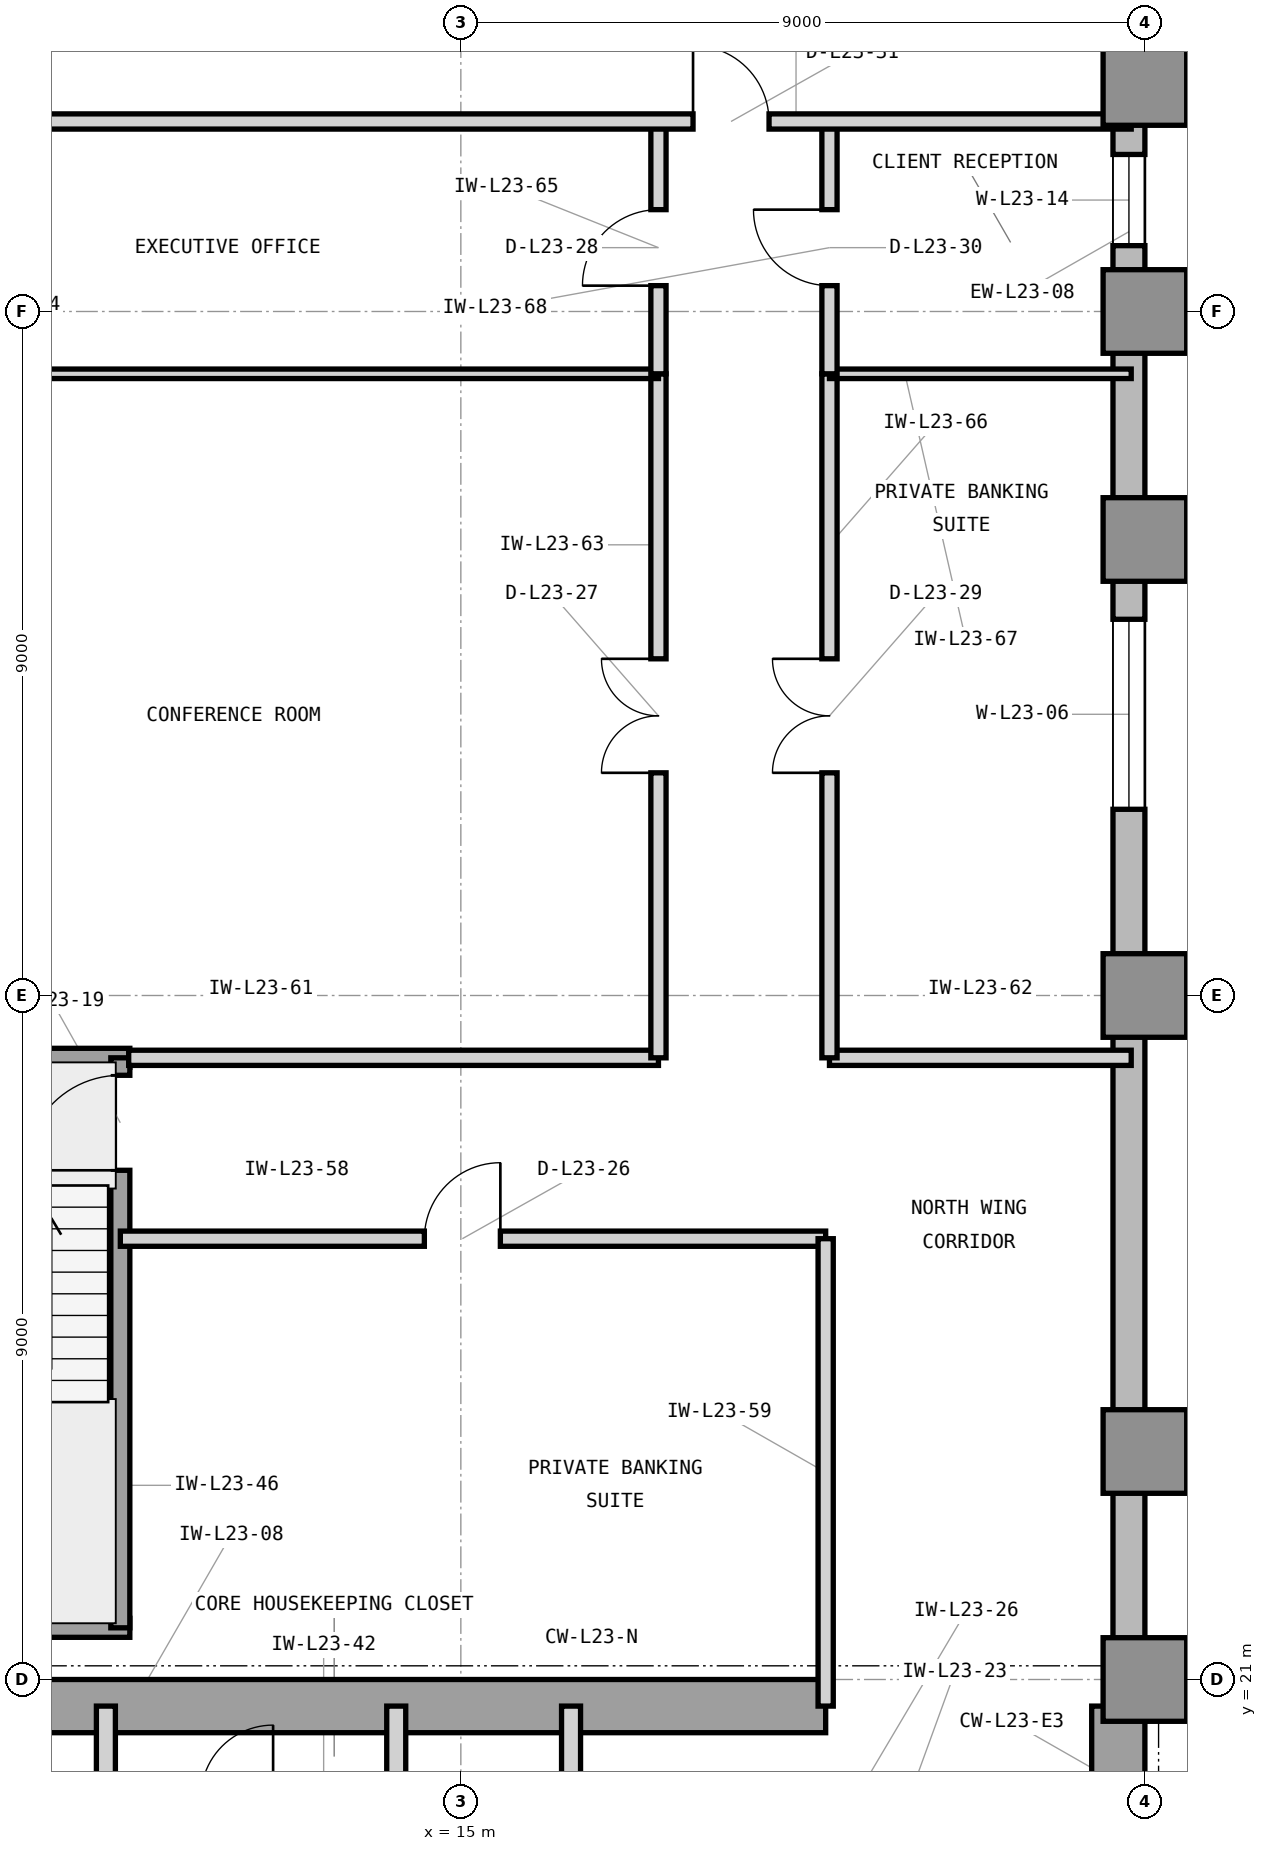
"""IFC4 building model, lengths in metres.
Left out: names, types, materials, properties, quantities, classifications, styles, units other than length and angle.
Written with IfcOpenShell. Run it as: python <this file> out.ifc"""

import sys

from ifc_helpers import new_model, si_unit, direction, frame, frame_2d, origin, origin_2d, place, context, subcontext, project, spatial, rectangle, extrude, element, fill, save


model = new_model("IFC4")
c1 = context("Model", 3, precision=1e-05, world=origin(), true_north=direction((0.0, 1.0)))
c2 = subcontext(c1, "Body", "Model", "MODEL_VIEW")
j1 = project(units=[si_unit("LENGTHUNIT", "METRE"), si_unit("PLANEANGLEUNIT", "RADIAN")], contexts=[c1])
p1 = place(None, origin())
s1 = spatial("IfcSite", under=j1, at=p1, CompositionType="ELEMENT")
p2 = place(p1, origin())
s2 = spatial("IfcBuilding", under=s1, at=p2, CompositionType="ELEMENT")
p3 = place(p2, frame((0.0, 0.0, 101.1)))
s3 = spatial("IfcBuildingStorey", under=s2, at=p3, CompositionType="ELEMENT", Elevation=101.1)
p4 = place(p3, frame((7.475, 20.65, 0.0), z_axis=(0.0, 0.0, 1.0), x_axis=(1.0, 0.0, 0.0)))
e1 = element("IfcWall", 1, at=p4, inside=s3, PredefinedType="SHEAR", context=c2, shape_type="SweptSolid", body=[
    extrude(rectangle(XDim=12.325, YDim=0.7, at=frame_2d((6.163, 0.0))), origin(), (0.0, 0.0, 1.0), 3.9),
])
p5 = place(p3, frame((23.65, 16.6, 0.0), z_axis=(0.0, 0.0, 1.0), x_axis=(0.0, 1.0, 0.0)))
e2 = element("IfcWall", 2, at=p5, inside=s3, PredefinedType="SHEAR", context=c2, shape_type="SweptSolid", body=[
    extrude(rectangle(XDim=4.05, YDim=0.7, at=frame_2d((2.025, 0.0))), origin(), (0.0, 0.0, 1.0), 3.9),
])
for number, where, z_axis, x_axis in (
    (3, (24.0, 21.0, 0.0), (0.0, 0.0, 1.0), (1.0, 0.0, 0.0)),
    (4, (24.0, 24.0, 0.0), (0.0, 0.0, 1.0), (1.0, 0.0, 0.0)),
    (5, (24.0, 30.0, 0.0), (0.0, 0.0, 1.0), (1.0, 0.0, 0.0)),
    (6, (24.0, 36.0, 0.0), (0.0, 0.0, 1.0), (1.0, 0.0, 0.0)),
    (7, (24.0, 39.0, 0.0), (0.0, 0.0, 1.0), (1.0, 0.0, 0.0)),
    (8, (24.0, 42.0, 0.0), (0.0, 0.0, 1.0), (1.0, 0.0, 0.0)),
):
    element("IfcColumn", number, at=place(p3, frame(where, z_axis=z_axis, x_axis=x_axis)), inside=s3, PredefinedType="COLUMN", context=c2, shape_type="SweptSolid", body=[
        extrude(rectangle(XDim=1.1, YDim=1.1, at=origin_2d()), origin(), (0.0, 0.0, 1.0), 3.9),
    ])
p6 = place(p3, frame((23.79, 21.0, 0.0), z_axis=(0.0, 0.0, 1.0), x_axis=(0.0, 1.0, 0.0)))
e9 = element("IfcWall", 9, at=p6, inside=s3, PredefinedType="STANDARD", context=c2, shape_type="SweptSolid", body=[
    extrude(rectangle(XDim=25.4, YDim=0.42, at=frame_2d((12.7, 0.0))), origin(), (0.0, 0.0, 1.0), 3.7),
])
p7 = place(p6, frame((11.45, 0.0, 0.85)))
e10 = element("IfcOpeningElement", 10, at=p7, cuts=e9, PredefinedType="OPENING", context=c2, shape_type="SweptSolid", body=[
    extrude(rectangle(XDim=2.5, YDim=2.25, at=frame_2d((1.25, 1.125))), frame((0.0, 0.22, 0.0), z_axis=(0.0, -1.0, 0.0), x_axis=(1.0, 0.0, 0.0)), (0.0, 0.0, 1.0), 0.44),
])
p8 = place(p6, frame((18.866, 0.0, 0.85)))
e11 = element("IfcOpeningElement", 11, at=p8, cuts=e9, PredefinedType="OPENING", context=c2, shape_type="SweptSolid", body=[
    extrude(rectangle(XDim=1.2, YDim=2.25, at=frame_2d((0.6, 1.125))), frame((0.0, 0.22, 0.0), z_axis=(0.0, -1.0, 0.0), x_axis=(1.0, 0.0, 0.0)), (0.0, 0.0, 1.0), 0.44),
])
p9 = place(p3, frame((10.33, 19.45, 0.0), z_axis=(0.0, 0.0, 1.0), x_axis=(0.0, 1.0, 0.0)))
e12 = element("IfcWall", 12, at=p9, inside=s3, PredefinedType="PARTITIONING", context=c2, shape_type="SweptSolid", body=[
    extrude(rectangle(XDim=1.2, YDim=0.25, at=frame_2d((0.6, 0.0))), origin(), (0.0, 0.0, 1.0), 2.917),
])
for number, where, z_axis, x_axis in (
    (13, (14.15, 16.7, 0.0), (0.0, 0.0, 1.0), (0.0, 1.0, 0.0)),
    (14, (16.45, 16.7, 0.0), (0.0, 0.0, 1.0), (0.0, 1.0, 0.0)),
):
    element("IfcWall", number, at=place(p3, frame(where, z_axis=z_axis, x_axis=x_axis)), inside=s3, PredefinedType="PARTITIONING", context=c2, shape_type="SweptSolid", body=[
        extrude(rectangle(XDim=3.95, YDim=0.25, at=frame_2d((1.975, 0.0))), origin(), (0.0, 0.0, 1.0), 3.69),
    ])
for number, where, z_axis, x_axis in (
    (15, (6.555, 21.68, 0.0), (0.0, 0.0, 1.0), (1.0, 0.0, 0.0)),
    (16, (6.555, 29.18, 0.0), (0.0, 0.0, 1.0), (1.0, 0.0, 0.0)),
):
    element("IfcWall", number, at=place(p3, frame(where, z_axis=z_axis, x_axis=x_axis)), inside=s3, PredefinedType="SHEAR", context=c2, shape_type="SweptSolid", body=[
        extrude(rectangle(XDim=4.09, YDim=0.25, at=frame_2d((2.045, 0.0))), origin(), (0.0, 0.0, 1.0), 3.9),
    ])
p10 = place(p3, frame((10.52, 21.68, 0.0), z_axis=(0.0, 0.0, 1.0), x_axis=(0.0, 1.0, 0.0)))
e17 = element("IfcWall", 17, at=p10, inside=s3, PredefinedType="SHEAR", context=c2, shape_type="SweptSolid", body=[
    extrude(rectangle(XDim=7.5, YDim=0.25, at=frame_2d((3.75, 0.0))), origin(), (0.0, 0.0, 1.0), 3.9),
])
p11 = place(p10, frame((6.02, 0.0, 0.0)))
e18 = element("IfcOpeningElement", 18, at=p11, cuts=e17, PredefinedType="OPENING", context=c2, shape_type="SweptSolid", body=[
    extrude(rectangle(XDim=1.25, YDim=2.2, at=frame_2d((0.625, 1.1))), frame((0.0, 0.135, 0.0), z_axis=(0.0, -1.0, 0.0), x_axis=(1.0, 0.0, 0.0)), (0.0, 0.0, 1.0), 0.27),
])
p12 = place(p3, frame((10.52, 26.8, 0.0), z_axis=(0.0, 0.0, 1.0), x_axis=(1.0, 0.0, 0.0)))
e19 = element("IfcWall", 19, at=p12, inside=s3, PredefinedType="PARTITIONING", context=c2, shape_type="SweptSolid", body=[
    extrude(rectangle(XDim=9.28, YDim=0.2, at=frame_2d((4.64, 0.0))), origin(), (0.0, 0.0, 1.0), 3.69),
])
p13 = place(p12, frame((4.0, 0.0, 0.0)))
e20 = element("IfcOpeningElement", 20, at=p13, cuts=e19, PredefinedType="OPENING", context=c2, shape_type="SweptSolid", body=[
    extrude(rectangle(XDim=1.0, YDim=2.15, at=frame_2d((0.5, 1.075))), frame((0.0, 0.11, 0.0), z_axis=(0.0, -1.0, 0.0), x_axis=(1.0, 0.0, 0.0)), (0.0, 0.0, 1.0), 0.22),
])
p14 = place(p3, frame((19.8, 20.65, 0.0), z_axis=(0.0, 0.0, 1.0), x_axis=(0.0, 1.0, 0.0)))
e21 = element("IfcWall", 21, at=p14, inside=s3, PredefinedType="PARTITIONING", context=c2, shape_type="SweptSolid", body=[
    extrude(rectangle(XDim=6.15, YDim=0.2, at=frame_2d((3.075, 0.0))), origin(), (0.0, 0.0, 1.0), 3.69),
])
p15 = place(p3, frame((10.63, 29.18, 0.0), z_axis=(0.0, 0.0, 1.0), x_axis=(1.0, 0.0, 0.0)))
e22 = element("IfcWall", 22, at=p15, inside=s3, PredefinedType="PARTITIONING", context=c2, shape_type="SweptSolid", body=[
    extrude(rectangle(XDim=6.97, YDim=0.2, at=frame_2d((3.485, 0.0))), origin(), (0.0, 0.0, 1.0), 3.69),
])
p16 = place(p3, frame((19.85, 29.18, 0.0), z_axis=(0.0, 0.0, 1.0), x_axis=(1.0, 0.0, 0.0)))
e23 = element("IfcWall", 23, at=p16, inside=s3, PredefinedType="PARTITIONING", context=c2, shape_type="SweptSolid", body=[
    extrude(rectangle(XDim=3.97, YDim=0.2, at=frame_2d((1.985, 0.0))), origin(), (0.0, 0.0, 1.0), 3.69),
])
p17 = place(p3, frame((17.6, 29.18, 0.0), z_axis=(0.0, 0.0, 1.0), x_axis=(0.0, 1.0, 0.0)))
e24 = element("IfcWall", 24, at=p17, inside=s3, PredefinedType="PARTITIONING", context=c2, shape_type="SweptSolid", body=[
    extrude(rectangle(XDim=9.0, YDim=0.2, at=frame_2d((4.5, 0.0))), origin(), (0.0, 0.0, 1.0), 3.69),
])
p18 = place(p17, frame((3.75, 0.0, 0.0)))
e25 = element("IfcOpeningElement", 25, at=p18, cuts=e24, PredefinedType="OPENING", context=c2, shape_type="SweptSolid", body=[
    extrude(rectangle(XDim=1.5, YDim=2.3, at=frame_2d((0.75, 1.15))), frame((0.0, 0.11, 0.0), z_axis=(0.0, -1.0, 0.0), x_axis=(1.0, 0.0, 0.0)), (0.0, 0.0, 1.0), 0.22),
])
p19 = place(p3, frame((6.18, 38.18, 0.0), z_axis=(0.0, 0.0, 1.0), x_axis=(1.0, 0.0, 0.0)))
e26 = element("IfcWall", 26, at=p19, inside=s3, PredefinedType="PARTITIONING", context=c2, shape_type="SweptSolid", body=[
    extrude(rectangle(XDim=11.42, YDim=0.125, at=frame_2d((5.71, 0.0))), origin(), (0.0, 0.0, 1.0), 3.69),
])
p20 = place(p3, frame((17.6, 38.18, 0.0), z_axis=(0.0, 0.0, 1.0), x_axis=(0.0, 1.0, 0.0)))
e27 = element("IfcWall", 27, at=p20, inside=s3, PredefinedType="PARTITIONING", context=c2, shape_type="SweptSolid", body=[
    extrude(rectangle(XDim=3.32, YDim=0.2, at=frame_2d((1.66, 0.0))), origin(), (0.0, 0.0, 1.0), 3.69),
])
p21 = place(p20, frame((1.16, 0.0, 0.0)))
e28 = element("IfcOpeningElement", 28, at=p21, cuts=e27, PredefinedType="OPENING", context=c2, shape_type="SweptSolid", body=[
    extrude(rectangle(XDim=1.0, YDim=2.15, at=frame_2d((0.5, 1.075))), frame((0.0, 0.11, 0.0), z_axis=(0.0, -1.0, 0.0), x_axis=(1.0, 0.0, 0.0)), (0.0, 0.0, 1.0), 0.22),
])
p22 = place(p3, frame((19.85, 29.18, 0.0), z_axis=(0.0, 0.0, 1.0), x_axis=(0.0, 1.0, 0.0)))
e29 = element("IfcWall", 29, at=p22, inside=s3, PredefinedType="PARTITIONING", context=c2, shape_type="SweptSolid", body=[
    extrude(rectangle(XDim=9.0, YDim=0.2, at=frame_2d((4.5, 0.0))), origin(), (0.0, 0.0, 1.0), 3.69),
])
p23 = place(p22, frame((3.75, 0.0, 0.0)))
e30 = element("IfcOpeningElement", 30, at=p23, cuts=e29, PredefinedType="OPENING", context=c2, shape_type="SweptSolid", body=[
    extrude(rectangle(XDim=1.5, YDim=2.3, at=frame_2d((0.75, 1.15))), frame((0.0, 0.11, 0.0), z_axis=(0.0, -1.0, 0.0), x_axis=(1.0, 0.0, 0.0)), (0.0, 0.0, 1.0), 0.22),
])
p24 = place(p3, frame((19.85, 38.18, 0.0), z_axis=(0.0, 0.0, 1.0), x_axis=(1.0, 0.0, 0.0)))
e31 = element("IfcWall", 31, at=p24, inside=s3, PredefinedType="PARTITIONING", context=c2, shape_type="SweptSolid", body=[
    extrude(rectangle(XDim=3.97, YDim=0.125, at=frame_2d((1.985, 0.0))), origin(), (0.0, 0.0, 1.0), 3.69),
])
p25 = place(p3, frame((19.85, 38.18, 0.0), z_axis=(0.0, 0.0, 1.0), x_axis=(0.0, 1.0, 0.0)))
e32 = element("IfcWall", 32, at=p25, inside=s3, PredefinedType="PARTITIONING", context=c2, shape_type="SweptSolid", body=[
    extrude(rectangle(XDim=3.32, YDim=0.2, at=frame_2d((1.66, 0.0))), origin(), (0.0, 0.0, 1.0), 3.69),
])
p26 = place(p25, frame((1.16, 0.0, 0.0)))
e33 = element("IfcOpeningElement", 33, at=p26, cuts=e32, PredefinedType="OPENING", context=c2, shape_type="SweptSolid", body=[
    extrude(rectangle(XDim=1.0, YDim=2.15, at=frame_2d((0.5, 1.075))), frame((0.0, 0.11, 0.0), z_axis=(0.0, -1.0, 0.0), x_axis=(1.0, 0.0, 0.0)), (0.0, 0.0, 1.0), 0.22),
])
p27 = place(p3, frame((6.18, 41.5, 0.0), z_axis=(0.0, 0.0, 1.0), x_axis=(1.0, 0.0, 0.0)))
e34 = element("IfcWall", 34, at=p27, inside=s3, PredefinedType="PARTITIONING", context=c2, shape_type="SweptSolid", body=[
    extrude(rectangle(XDim=17.64, YDim=0.2, at=frame_2d((8.82, 0.0))), origin(), (0.0, 0.0, 1.0), 3.69),
])
p28 = place(p27, frame((11.875, 0.0, 0.0)))
e35 = element("IfcOpeningElement", 35, at=p28, cuts=e34, PredefinedType="OPENING", context=c2, shape_type="SweptSolid", body=[
    extrude(rectangle(XDim=1.0, YDim=2.15, at=frame_2d((0.5, 1.075))), frame((0.0, 0.11, 0.0), z_axis=(0.0, -1.0, 0.0), x_axis=(1.0, 0.0, 0.0)), (0.0, 0.0, 1.0), 0.22),
])
p29 = place(p7, origin())
e36 = element("IfcWindow", 36, at=p29, inside=s3, PartitioningType="SINGLE_PANEL", PredefinedType="WINDOW", context=c2, shape_type="SweptSolid", body=[
    extrude(rectangle(XDim=2.5, YDim=2.25, at=frame_2d((1.25, 1.125))), frame((0.0, 0.11, 0.0), z_axis=(0.0, -1.0, 0.0), x_axis=(1.0, 0.0, 0.0)), (0.0, 0.0, 1.0), 0.06),
])
fill(e10, e36)
p30 = place(p11, origin())
e37 = element("IfcDoor", 37, at=p30, inside=s3, OperationType="SINGLE_SWING_LEFT", PredefinedType="DOOR", context=c2, shape_type="SweptSolid", body=[
    extrude(rectangle(XDim=1.25, YDim=2.2, at=frame_2d((0.625, 1.1))), frame((0.0, 0.025, 0.0), z_axis=(0.0, -1.0, 0.0), x_axis=(1.0, 0.0, 0.0)), (0.0, 0.0, 1.0), 0.05),
])
fill(e18, e37)
p31 = place(p13, origin())
e38 = element("IfcDoor", 38, at=p31, inside=s3, OperationType="SINGLE_SWING_RIGHT", PredefinedType="DOOR", context=c2, shape_type="SweptSolid", body=[
    extrude(rectangle(XDim=1.0, YDim=2.15, at=frame_2d((0.5, 1.075))), frame((0.0, 0.025, 0.0), z_axis=(0.0, -1.0, 0.0), x_axis=(1.0, 0.0, 0.0)), (0.0, 0.0, 1.0), 0.05),
])
fill(e20, e38)
p32 = place(p18, origin())
e39 = element("IfcDoor", 39, at=p32, inside=s3, OperationType="DOUBLE_DOOR_SINGLE_SWING", PredefinedType="DOOR", context=c2, shape_type="SweptSolid", body=[
    extrude(rectangle(XDim=1.5, YDim=2.3, at=frame_2d((0.75, 1.15))), frame((0.0, 0.025, 0.0), z_axis=(0.0, -1.0, 0.0), x_axis=(1.0, 0.0, 0.0)), (0.0, 0.0, 1.0), 0.05),
])
fill(e25, e39)
p33 = place(p21, origin())
e40 = element("IfcDoor", 40, at=p33, inside=s3, OperationType="SINGLE_SWING_LEFT", PredefinedType="DOOR", context=c2, shape_type="SweptSolid", body=[
    extrude(rectangle(XDim=1.0, YDim=2.15, at=frame_2d((0.5, 1.075))), frame((0.0, 0.025, 0.0), z_axis=(0.0, -1.0, 0.0), x_axis=(1.0, 0.0, 0.0)), (0.0, 0.0, 1.0), 0.05),
])
fill(e28, e40)
p34 = place(p23, origin())
e41 = element("IfcDoor", 41, at=p34, inside=s3, OperationType="DOUBLE_DOOR_SINGLE_SWING", PredefinedType="DOOR", context=c2, shape_type="SweptSolid", body=[
    extrude(rectangle(XDim=1.5, YDim=2.3, at=frame_2d((0.75, 1.15))), frame((0.0, 0.025, 0.0), z_axis=(0.0, -1.0, 0.0), x_axis=(1.0, 0.0, 0.0)), (0.0, 0.0, 1.0), 0.05),
])
fill(e30, e41)
p35 = place(p26, origin())
e42 = element("IfcDoor", 42, at=p35, inside=s3, OperationType="SINGLE_SWING_RIGHT", PredefinedType="DOOR", context=c2, shape_type="SweptSolid", body=[
    extrude(rectangle(XDim=1.0, YDim=2.15, at=frame_2d((0.5, 1.075))), frame((0.0, 0.025, 0.0), z_axis=(0.0, -1.0, 0.0), x_axis=(1.0, 0.0, 0.0)), (0.0, 0.0, 1.0), 0.05),
])
fill(e33, e42)
p36 = place(p28, origin())
e43 = element("IfcDoor", 43, at=p36, inside=s3, OperationType="SINGLE_SWING_LEFT", PredefinedType="DOOR", context=c2, shape_type="SweptSolid", body=[
    extrude(rectangle(XDim=1.0, YDim=2.15, at=frame_2d((0.5, 1.075))), frame((0.0, 0.025, 0.0), z_axis=(0.0, -1.0, 0.0), x_axis=(1.0, 0.0, 0.0)), (0.0, 0.0, 1.0), 0.05),
])
fill(e35, e43)
p37 = place(p8, origin())
e44 = element("IfcWindow", 44, at=p37, inside=s3, PartitioningType="SINGLE_PANEL", PredefinedType="WINDOW", context=c2, shape_type="SweptSolid", body=[
    extrude(rectangle(XDim=1.2, YDim=2.25, at=frame_2d((0.6, 1.125))), frame((0.0, 0.11, 0.0), z_axis=(0.0, -1.0, 0.0), x_axis=(1.0, 0.0, 0.0)), (0.0, 0.0, 1.0), 0.06),
])
fill(e11, e44)
save(model, sys.argv[1])
